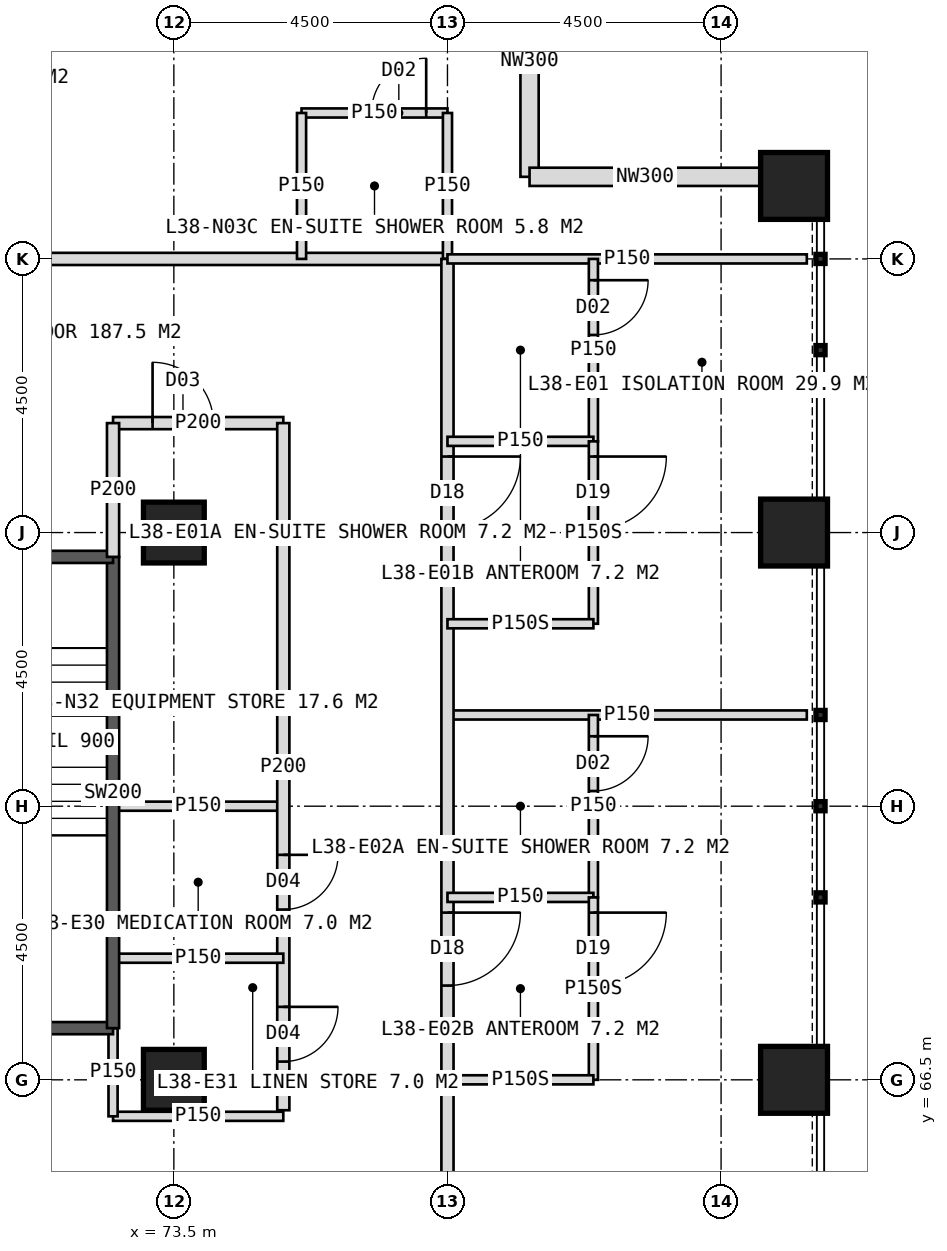
"""IFC4 building model, lengths in metres.
Left out: names, types, materials, properties, quantities, classifications, styles, units other than length and angle.
Written with IfcOpenShell. Run it as: python <this file> out.ifc"""

import sys

from ifc_helpers import new_model, si_unit, direction, frame, frame_2d, origin, origin_2d, place, context, subcontext, project, spatial, rectangle, hollow_rectangle, extrude, element, fill, save


model = new_model("IFC4")
c1 = context("Model", 3, precision=1e-05, world=origin(), true_north=direction((0.0, 1.0)))
c2 = subcontext(c1, "Body", "Model", "MODEL_VIEW")
j1 = project(units=[si_unit("LENGTHUNIT", "METRE"), si_unit("PLANEANGLEUNIT", "RADIAN")], contexts=[c1])
p1 = place(None, origin())
s1 = spatial("IfcSite", under=j1, at=p1, CompositionType="ELEMENT")
p2 = place(p1, origin())
s2 = spatial("IfcBuilding", under=s1, at=p2, CompositionType="ELEMENT")
p3 = place(p2, frame((0.0, 0.0, 160.0)))
s3 = spatial("IfcBuildingStorey", under=s2, at=p3, CompositionType="ELEMENT", Elevation=160.0)
for number, where, z_axis, x_axis in (
    (1, (73.5, 75.5, 0.0), (0.0, 0.0, 1.0), (1.0, 0.0, 0.0)),
    (2, (73.5, 66.5, 0.0), (0.0, 0.0, 1.0), (1.0, 0.0, 0.0)),
):
    element("IfcColumn", number, at=place(p3, frame(where, z_axis=z_axis, x_axis=x_axis)), inside=s3, PredefinedType="COLUMN", context=c2, shape_type="SweptSolid", body=[
        extrude(hollow_rectangle(XDim=1.0, YDim=1.0, WallThickness=0.1, at=origin_2d()), origin(), (0.0, 0.0, 1.0), 4.0),
    ])
for number, where, z_axis, x_axis in (
    (3, (83.7, 66.5, 0.0), (0.0, 0.0, 1.0), (1.0, 0.0, 0.0)),
    (4, (83.7, 75.5, 0.0), (0.0, 0.0, 1.0), (1.0, 0.0, 0.0)),
    (5, (83.7, 81.2, 0.0), (0.0, 0.0, 1.0), (1.0, 0.0, 0.0)),
):
    element("IfcColumn", number, at=place(p3, frame(where, z_axis=z_axis, x_axis=x_axis)), inside=s3, PredefinedType="COLUMN", context=c2, shape_type="SweptSolid", body=[
        extrude(hollow_rectangle(XDim=1.1, YDim=1.1, WallThickness=0.1, at=origin_2d()), origin(), (0.0, 0.0, 1.0), 4.0),
    ])
for number, where, z_axis, x_axis in (
    (6, (79.35, 85.15, 0.0), (0.0, 0.0, 1.0), (0.0, -1.0, 0.0)),
    (7, (79.35, 81.35, 0.0), (0.0, 0.0, 1.0), (1.0, 0.0, 0.0)),
):
    element("IfcWall", number, at=place(p3, frame(where, z_axis=z_axis, x_axis=x_axis)), inside=s3, PredefinedType="ELEMENTEDWALL", context=c2, shape_type="SweptSolid", body=[
        extrude(rectangle(XDim=3.8, YDim=0.3, at=frame_2d((1.9, 0.0))), origin(), (0.0, 0.0, 1.0), 4.0),
    ])
p4 = place(p3, frame((42.0, 80.0, 0.0), z_axis=(0.0, 0.0, 1.0), x_axis=(1.0, 0.0, 0.0)))
e8 = element("IfcWall", 8, at=p4, inside=s3, PredefinedType="PARTITIONING", context=c2, shape_type="SweptSolid", body=[
    extrude(rectangle(XDim=36.0, YDim=0.2, at=frame_2d((18.0, 0.0))), origin(), (0.0, 0.0, 1.0), 3.75),
])
p5 = place(p4, frame((3.25, 0.0, 0.0)))
e9 = element("IfcOpeningElement", 9, at=p5, cuts=e8, PredefinedType="OPENING", context=c2, shape_type="SweptSolid", body=[
    extrude(rectangle(XDim=1.2, YDim=2.2, at=frame_2d((0.6, 1.1))), frame((0.0, 0.11, 0.0), z_axis=(0.0, -1.0, 0.0), x_axis=(1.0, 0.0, 0.0)), (0.0, 0.0, 1.0), 0.22),
])
p6 = place(p4, frame((13.75, 0.0, 0.0)))
e10 = element("IfcOpeningElement", 10, at=p6, cuts=e8, PredefinedType="OPENING", context=c2, shape_type="SweptSolid", body=[
    extrude(rectangle(XDim=1.0, YDim=2.1, at=frame_2d((0.5, 1.05))), frame((0.0, 0.11, 0.0), z_axis=(0.0, -1.0, 0.0), x_axis=(1.0, 0.0, 0.0)), (0.0, 0.0, 1.0), 0.22),
])
p7 = place(p4, frame((22.15, 0.0, 0.0)))
e11 = element("IfcOpeningElement", 11, at=p7, cuts=e8, PredefinedType="OPENING", context=c2, shape_type="SweptSolid", body=[
    extrude(rectangle(XDim=1.2, YDim=2.2, at=frame_2d((0.6, 1.1))), frame((0.0, 0.11, 0.0), z_axis=(0.0, -1.0, 0.0), x_axis=(1.0, 0.0, 0.0)), (0.0, 0.0, 1.0), 0.22),
])
p8 = place(p3, frame((75.6, 82.4, 0.0), z_axis=(0.0, 0.0, 1.0), x_axis=(1.0, 0.0, 0.0)))
e12 = element("IfcWall", 12, at=p8, inside=s3, PredefinedType="PARTITIONING", context=c2, shape_type="SweptSolid", body=[
    extrude(rectangle(XDim=2.4, YDim=0.15, at=frame_2d((1.2, 0.0))), origin(), (0.0, 0.0, 1.0), 3.75),
])
p9 = place(p8, frame((1.15, 0.0, 0.0)))
e13 = element("IfcOpeningElement", 13, at=p9, cuts=e12, PredefinedType="OPENING", context=c2, shape_type="SweptSolid", body=[
    extrude(rectangle(XDim=0.9, YDim=2.1, at=frame_2d((0.45, 1.05))), frame((0.0, 0.085, 0.0), z_axis=(0.0, -1.0, 0.0), x_axis=(1.0, 0.0, 0.0)), (0.0, 0.0, 1.0), 0.17),
])
for number, where, z_axis, x_axis in (
    (14, (75.6, 80.0, 0.0), (0.0, 0.0, 1.0), (0.0, 1.0, 0.0)),
    (15, (78.0, 80.0, 0.0), (0.0, 0.0, 1.0), (0.0, 1.0, 0.0)),
):
    element("IfcWall", number, at=place(p3, frame(where, z_axis=z_axis, x_axis=x_axis)), inside=s3, PredefinedType="PARTITIONING", context=c2, shape_type="SweptSolid", body=[
        extrude(rectangle(XDim=2.4, YDim=0.15, at=frame_2d((1.2, 0.0))), origin(), (0.0, 0.0, 1.0), 3.75),
    ])
p10 = place(p3, frame((72.5, 77.3, 0.0), z_axis=(0.0, 0.0, 1.0), x_axis=(1.0, 0.0, 0.0)))
e16 = element("IfcWall", 16, at=p10, inside=s3, PredefinedType="PARTITIONING", context=c2, shape_type="SweptSolid", body=[
    extrude(rectangle(XDim=2.8, YDim=0.2, at=frame_2d((1.4, 0.0))), origin(), (0.0, 0.0, 1.0), 3.75),
])
p11 = place(p10, frame((0.65, 0.0, 0.0)))
e17 = element("IfcOpeningElement", 17, at=p11, cuts=e16, PredefinedType="OPENING", context=c2, shape_type="SweptSolid", body=[
    extrude(rectangle(XDim=1.0, YDim=2.1, at=frame_2d((0.5, 1.05))), frame((0.0, 0.11, 0.0), z_axis=(0.0, -1.0, 0.0), x_axis=(1.0, 0.0, 0.0)), (0.0, 0.0, 1.0), 0.22),
])
p12 = place(p3, frame((78.0, 72.5, 0.0), z_axis=(0.0, 0.0, 1.0), x_axis=(1.0, 0.0, 0.0)))
e18 = element("IfcWall", 18, at=p12, inside=s3, PredefinedType="PARTITIONING", context=c2, shape_type="SweptSolid", body=[
    extrude(rectangle(XDim=5.91, YDim=0.15, at=frame_2d((2.955, 0.0))), origin(), (0.0, 0.0, 1.0), 3.75),
])
p13 = place(p3, frame((78.0, 80.0, 0.0), z_axis=(0.0, 0.0, 1.0), x_axis=(0.0, -1.0, 0.0)))
e19 = element("IfcWall", 19, at=p13, inside=s3, PredefinedType="PARTITIONING", context=c2, shape_type="SweptSolid", body=[
    extrude(rectangle(XDim=36.0, YDim=0.2, at=frame_2d((18.0, 0.0))), origin(), (0.0, 0.0, 1.0), 3.75),
])
p14 = place(p13, frame((3.25, 0.0, 0.0)))
e20 = element("IfcOpeningElement", 20, at=p14, cuts=e19, PredefinedType="OPENING", context=c2, shape_type="SweptSolid", body=[
    extrude(rectangle(XDim=1.2, YDim=2.2, at=frame_2d((0.6, 1.1))), frame((0.0, 0.11, 0.0), z_axis=(0.0, -1.0, 0.0), x_axis=(1.0, 0.0, 0.0)), (0.0, 0.0, 1.0), 0.22),
])
p15 = place(p13, frame((10.75, 0.0, 0.0)))
e21 = element("IfcOpeningElement", 21, at=p15, cuts=e19, PredefinedType="OPENING", context=c2, shape_type="SweptSolid", body=[
    extrude(rectangle(XDim=1.2, YDim=2.2, at=frame_2d((0.6, 1.1))), frame((0.0, 0.11, 0.0), z_axis=(0.0, -1.0, 0.0), x_axis=(1.0, 0.0, 0.0)), (0.0, 0.0, 1.0), 0.22),
])
p16 = place(p13, frame((21.25, 0.0, 0.0)))
e22 = element("IfcOpeningElement", 22, at=p16, cuts=e19, PredefinedType="OPENING", context=c2, shape_type="SweptSolid", body=[
    extrude(rectangle(XDim=1.2, YDim=2.2, at=frame_2d((0.6, 1.1))), frame((0.0, 0.11, 0.0), z_axis=(0.0, -1.0, 0.0), x_axis=(1.0, 0.0, 0.0)), (0.0, 0.0, 1.0), 0.22),
])
p17 = place(p13, frame((31.75, 0.0, 0.0)))
e23 = element("IfcOpeningElement", 23, at=p17, cuts=e19, PredefinedType="OPENING", context=c2, shape_type="SweptSolid", body=[
    extrude(rectangle(XDim=1.2, YDim=2.2, at=frame_2d((0.6, 1.1))), frame((0.0, 0.11, 0.0), z_axis=(0.0, -1.0, 0.0), x_axis=(1.0, 0.0, 0.0)), (0.0, 0.0, 1.0), 0.22),
])
p18 = place(p3, frame((78.0, 80.0, 0.0), z_axis=(0.0, 0.0, 1.0), x_axis=(1.0, 0.0, 0.0)))
e24 = element("IfcWall", 24, at=p18, inside=s3, PredefinedType="PARTITIONING", context=c2, shape_type="SweptSolid", body=[
    extrude(rectangle(XDim=5.91, YDim=0.15, at=frame_2d((2.955, 0.0))), origin(), (0.0, 0.0, 1.0), 3.75),
])
p19 = place(p3, frame((80.4, 80.0, 0.0), z_axis=(0.0, 0.0, 1.0), x_axis=(0.0, -1.0, 0.0)))
e25 = element("IfcWall", 25, at=p19, inside=s3, PredefinedType="PARTITIONING", context=c2, shape_type="SweptSolid", body=[
    extrude(rectangle(XDim=3.0, YDim=0.15, at=frame_2d((1.5, 0.0))), origin(), (0.0, 0.0, 1.0), 3.75),
])
p20 = place(p19, frame((0.35, 0.0, 0.0)))
e26 = element("IfcOpeningElement", 26, at=p20, cuts=e25, PredefinedType="OPENING", context=c2, shape_type="SweptSolid", body=[
    extrude(rectangle(XDim=0.9, YDim=2.1, at=frame_2d((0.45, 1.05))), frame((0.0, 0.085, 0.0), z_axis=(0.0, -1.0, 0.0), x_axis=(1.0, 0.0, 0.0)), (0.0, 0.0, 1.0), 0.17),
])
p21 = place(p3, frame((78.0, 77.0, 0.0), z_axis=(0.0, 0.0, 1.0), x_axis=(1.0, 0.0, 0.0)))
e27 = element("IfcWall", 27, at=p21, inside=s3, PredefinedType="PARTITIONING", context=c2, shape_type="SweptSolid", body=[
    extrude(rectangle(XDim=2.4, YDim=0.15, at=frame_2d((1.2, 0.0))), origin(), (0.0, 0.0, 1.0), 3.75),
])
p22 = place(p3, frame((80.4, 77.0, 0.0), z_axis=(0.0, 0.0, 1.0), x_axis=(0.0, -1.0, 0.0)))
e28 = element("IfcWall", 28, at=p22, inside=s3, PredefinedType="PARTITIONING", context=c2, shape_type="SweptSolid", body=[
    extrude(rectangle(XDim=3.0, YDim=0.15, at=frame_2d((1.5, 0.0))), origin(), (0.0, 0.0, 1.0), 3.75),
])
p23 = place(p22, frame((0.25, 0.0, 0.0)))
e29 = element("IfcOpeningElement", 29, at=p23, cuts=e28, PredefinedType="OPENING", context=c2, shape_type="SweptSolid", body=[
    extrude(rectangle(XDim=1.2, YDim=2.2, at=frame_2d((0.6, 1.1))), frame((0.0, 0.085, 0.0), z_axis=(0.0, -1.0, 0.0), x_axis=(1.0, 0.0, 0.0)), (0.0, 0.0, 1.0), 0.17),
])
p24 = place(p3, frame((78.0, 74.0, 0.0), z_axis=(0.0, 0.0, 1.0), x_axis=(1.0, 0.0, 0.0)))
e30 = element("IfcWall", 30, at=p24, inside=s3, PredefinedType="PARTITIONING", context=c2, shape_type="SweptSolid", body=[
    extrude(rectangle(XDim=2.4, YDim=0.15, at=frame_2d((1.2, 0.0))), origin(), (0.0, 0.0, 1.0), 3.75),
])
p25 = place(p3, frame((80.4, 72.5, 0.0), z_axis=(0.0, 0.0, 1.0), x_axis=(0.0, -1.0, 0.0)))
e31 = element("IfcWall", 31, at=p25, inside=s3, PredefinedType="PARTITIONING", context=c2, shape_type="SweptSolid", body=[
    extrude(rectangle(XDim=3.0, YDim=0.15, at=frame_2d((1.5, 0.0))), origin(), (0.0, 0.0, 1.0), 3.75),
])
p26 = place(p25, frame((0.35, 0.0, 0.0)))
e32 = element("IfcOpeningElement", 32, at=p26, cuts=e31, PredefinedType="OPENING", context=c2, shape_type="SweptSolid", body=[
    extrude(rectangle(XDim=0.9, YDim=2.1, at=frame_2d((0.45, 1.05))), frame((0.0, 0.085, 0.0), z_axis=(0.0, -1.0, 0.0), x_axis=(1.0, 0.0, 0.0)), (0.0, 0.0, 1.0), 0.17),
])
p27 = place(p3, frame((78.0, 69.5, 0.0), z_axis=(0.0, 0.0, 1.0), x_axis=(1.0, 0.0, 0.0)))
e33 = element("IfcWall", 33, at=p27, inside=s3, PredefinedType="PARTITIONING", context=c2, shape_type="SweptSolid", body=[
    extrude(rectangle(XDim=2.4, YDim=0.15, at=frame_2d((1.2, 0.0))), origin(), (0.0, 0.0, 1.0), 3.75),
])
p28 = place(p3, frame((80.4, 69.5, 0.0), z_axis=(0.0, 0.0, 1.0), x_axis=(0.0, -1.0, 0.0)))
e34 = element("IfcWall", 34, at=p28, inside=s3, PredefinedType="PARTITIONING", context=c2, shape_type="SweptSolid", body=[
    extrude(rectangle(XDim=3.0, YDim=0.15, at=frame_2d((1.5, 0.0))), origin(), (0.0, 0.0, 1.0), 3.75),
])
p29 = place(p28, frame((0.25, 0.0, 0.0)))
e35 = element("IfcOpeningElement", 35, at=p29, cuts=e34, PredefinedType="OPENING", context=c2, shape_type="SweptSolid", body=[
    extrude(rectangle(XDim=1.2, YDim=2.2, at=frame_2d((0.6, 1.1))), frame((0.0, 0.085, 0.0), z_axis=(0.0, -1.0, 0.0), x_axis=(1.0, 0.0, 0.0)), (0.0, 0.0, 1.0), 0.17),
])
p30 = place(p3, frame((78.0, 66.5, 0.0), z_axis=(0.0, 0.0, 1.0), x_axis=(1.0, 0.0, 0.0)))
e36 = element("IfcWall", 36, at=p30, inside=s3, PredefinedType="PARTITIONING", context=c2, shape_type="SweptSolid", body=[
    extrude(rectangle(XDim=2.4, YDim=0.15, at=frame_2d((1.2, 0.0))), origin(), (0.0, 0.0, 1.0), 2.95),
])
p31 = place(p3, frame((72.5, 71.0, 0.0), z_axis=(0.0, 0.0, 1.0), x_axis=(1.0, 0.0, 0.0)))
e37 = element("IfcWall", 37, at=p31, inside=s3, PredefinedType="PARTITIONING", context=c2, shape_type="SweptSolid", body=[
    extrude(rectangle(XDim=2.8, YDim=0.15, at=frame_2d((1.4, 0.0))), origin(), (0.0, 0.0, 1.0), 3.75),
])
p32 = place(p3, frame((75.3, 77.3, 0.0), z_axis=(0.0, 0.0, 1.0), x_axis=(0.0, -1.0, 0.0)))
e38 = element("IfcWall", 38, at=p32, inside=s3, PredefinedType="PARTITIONING", context=c2, shape_type="SweptSolid", body=[
    extrude(rectangle(XDim=11.3, YDim=0.2, at=frame_2d((5.65, 0.0))), origin(), (0.0, 0.0, 1.0), 3.75),
])
p33 = place(p32, frame((7.1, 0.0, 0.0)))
e39 = element("IfcOpeningElement", 39, at=p33, cuts=e38, PredefinedType="OPENING", context=c2, shape_type="SweptSolid", body=[
    extrude(rectangle(XDim=0.9, YDim=2.1, at=frame_2d((0.45, 1.05))), frame((0.0, 0.11, 0.0), z_axis=(0.0, -1.0, 0.0), x_axis=(1.0, 0.0, 0.0)), (0.0, 0.0, 1.0), 0.22),
])
p34 = place(p32, frame((9.6, 0.0, 0.0)))
e40 = element("IfcOpeningElement", 40, at=p34, cuts=e38, PredefinedType="OPENING", context=c2, shape_type="SweptSolid", body=[
    extrude(rectangle(XDim=0.9, YDim=2.1, at=frame_2d((0.45, 1.05))), frame((0.0, 0.11, 0.0), z_axis=(0.0, -1.0, 0.0), x_axis=(1.0, 0.0, 0.0)), (0.0, 0.0, 1.0), 0.22),
])
for number, where, z_axis, x_axis in (
    (41, (72.5, 65.9, 0.0), (0.0, 0.0, 1.0), (1.0, 0.0, 0.0)),
    (42, (72.5, 68.5, 0.0), (0.0, 0.0, 1.0), (1.0, 0.0, 0.0)),
):
    element("IfcWall", number, at=place(p3, frame(where, z_axis=z_axis, x_axis=x_axis)), inside=s3, PredefinedType="PARTITIONING", context=c2, shape_type="SweptSolid", body=[
        extrude(rectangle(XDim=2.8, YDim=0.15, at=frame_2d((1.4, 0.0))), origin(), (0.0, 0.0, 1.0), 3.75),
    ])
p35 = place(p3, frame((72.5, 65.9, 0.0), z_axis=(0.0, 0.0, 1.0), x_axis=(0.0, 1.0, 0.0)))
e43 = element("IfcWall", 43, at=p35, inside=s3, PredefinedType="PARTITIONING", context=c2, shape_type="SweptSolid", body=[
    extrude(rectangle(XDim=1.45, YDim=0.15, at=frame_2d((0.725, 0.0))), origin(), (0.0, 0.0, 1.0), 3.75),
])
p36 = place(p3, frame((69.0, 67.35, 0.0), z_axis=(0.0, 0.0, 1.0), x_axis=(1.0, 0.0, 0.0)))
e44 = element("IfcWall", 44, at=p36, inside=s3, PredefinedType="SOLIDWALL", context=c2, shape_type="SweptSolid", body=[
    extrude(rectangle(XDim=3.5, YDim=0.2, at=frame_2d((1.75, 0.0))), origin(), (0.0, 0.0, 1.0), 3.75),
])
p37 = place(p3, frame((72.5, 67.35, 0.0), z_axis=(0.0, 0.0, 1.0), x_axis=(0.0, 1.0, 0.0)))
e45 = element("IfcWall", 45, at=p37, inside=s3, PredefinedType="SOLIDWALL", context=c2, shape_type="SweptSolid", body=[
    extrude(rectangle(XDim=7.75, YDim=0.2, at=frame_2d((3.875, 0.0))), origin(), (0.0, 0.0, 1.0), 3.75),
])
p38 = place(p3, frame((69.0, 75.1, 0.0), z_axis=(0.0, 0.0, 1.0), x_axis=(1.0, 0.0, 0.0)))
e46 = element("IfcWall", 46, at=p38, inside=s3, PredefinedType="SOLIDWALL", context=c2, shape_type="SweptSolid", body=[
    extrude(rectangle(XDim=3.5, YDim=0.2, at=frame_2d((1.75, 0.0))), origin(), (0.0, 0.0, 1.0), 3.75),
])
p39 = place(p38, frame((1.15, 0.0, 0.0)))
e47 = element("IfcOpeningElement", 47, at=p39, cuts=e46, PredefinedType="OPENING", context=c2, shape_type="SweptSolid", body=[
    extrude(rectangle(XDim=1.2, YDim=2.1, at=frame_2d((0.6, 1.05))), frame((0.0, 0.11, 0.0), z_axis=(0.0, -1.0, 0.0), x_axis=(1.0, 0.0, 0.0)), (0.0, 0.0, 1.0), 0.22),
])
p40 = place(p3, frame((72.5, 75.1, 0.0), z_axis=(0.0, 0.0, 1.0), x_axis=(0.0, 1.0, 0.0)))
e48 = element("IfcWall", 48, at=p40, inside=s3, PredefinedType="PARTITIONING", context=c2, shape_type="SweptSolid", body=[
    extrude(rectangle(XDim=2.2, YDim=0.2, at=frame_2d((1.1, 0.0))), origin(), (0.0, 0.0, 1.0), 3.75),
])
p41 = place(p9, origin())
e49 = element("IfcDoor", 49, at=p41, inside=s3, OperationType="SINGLE_SWING_RIGHT", PredefinedType="DOOR", context=c2, shape_type="SweptSolid", body=[
    extrude(rectangle(XDim=0.9, YDim=2.1, at=frame_2d((0.45, 1.05))), frame((0.0, 0.025, 0.0), z_axis=(0.0, -1.0, 0.0), x_axis=(1.0, 0.0, 0.0)), (0.0, 0.0, 1.0), 0.05),
])
fill(e13, e49)
p42 = place(p11, origin())
e50 = element("IfcDoor", 50, at=p42, inside=s3, OperationType="SINGLE_SWING_LEFT", PredefinedType="DOOR", context=c2, shape_type="SweptSolid", body=[
    extrude(rectangle(XDim=1.0, YDim=2.1, at=frame_2d((0.5, 1.05))), frame((0.0, 0.025, 0.0), z_axis=(0.0, -1.0, 0.0), x_axis=(1.0, 0.0, 0.0)), (0.0, 0.0, 1.0), 0.05),
])
fill(e17, e50)
p43 = place(p23, origin())
e51 = element("IfcDoor", 51, at=p43, inside=s3, OperationType="SINGLE_SWING_LEFT", PredefinedType="DOOR", context=c2, shape_type="SweptSolid", body=[
    extrude(rectangle(XDim=1.2, YDim=2.2, at=frame_2d((0.6, 1.1))), frame((0.0, 0.025, 0.0), z_axis=(0.0, -1.0, 0.0), x_axis=(1.0, 0.0, 0.0)), (0.0, 0.0, 1.0), 0.05),
])
fill(e29, e51)
p44 = place(p14, origin())
e52 = element("IfcDoor", 52, at=p44, inside=s3, OperationType="SINGLE_SWING_LEFT", PredefinedType="DOOR", context=c2, shape_type="SweptSolid", body=[
    extrude(rectangle(XDim=1.2, YDim=2.2, at=frame_2d((0.6, 1.1))), frame((0.0, 0.025, 0.0), z_axis=(0.0, -1.0, 0.0), x_axis=(1.0, 0.0, 0.0)), (0.0, 0.0, 1.0), 0.05),
])
fill(e20, e52)
p45 = place(p20, origin())
e53 = element("IfcDoor", 53, at=p45, inside=s3, OperationType="SINGLE_SWING_LEFT", PredefinedType="DOOR", context=c2, shape_type="SweptSolid", body=[
    extrude(rectangle(XDim=0.9, YDim=2.1, at=frame_2d((0.45, 1.05))), frame((0.0, 0.025, 0.0), z_axis=(0.0, -1.0, 0.0), x_axis=(1.0, 0.0, 0.0)), (0.0, 0.0, 1.0), 0.05),
])
fill(e26, e53)
p46 = place(p29, origin())
e54 = element("IfcDoor", 54, at=p46, inside=s3, OperationType="SINGLE_SWING_LEFT", PredefinedType="DOOR", context=c2, shape_type="SweptSolid", body=[
    extrude(rectangle(XDim=1.2, YDim=2.2, at=frame_2d((0.6, 1.1))), frame((0.0, 0.025, 0.0), z_axis=(0.0, -1.0, 0.0), x_axis=(1.0, 0.0, 0.0)), (0.0, 0.0, 1.0), 0.05),
])
fill(e35, e54)
p47 = place(p15, origin())
e55 = element("IfcDoor", 55, at=p47, inside=s3, OperationType="SINGLE_SWING_LEFT", PredefinedType="DOOR", context=c2, shape_type="SweptSolid", body=[
    extrude(rectangle(XDim=1.2, YDim=2.2, at=frame_2d((0.6, 1.1))), frame((0.0, 0.025, 0.0), z_axis=(0.0, -1.0, 0.0), x_axis=(1.0, 0.0, 0.0)), (0.0, 0.0, 1.0), 0.05),
])
fill(e21, e55)
p48 = place(p26, origin())
e56 = element("IfcDoor", 56, at=p48, inside=s3, OperationType="SINGLE_SWING_LEFT", PredefinedType="DOOR", context=c2, shape_type="SweptSolid", body=[
    extrude(rectangle(XDim=0.9, YDim=2.1, at=frame_2d((0.45, 1.05))), frame((0.0, 0.025, 0.0), z_axis=(0.0, -1.0, 0.0), x_axis=(1.0, 0.0, 0.0)), (0.0, 0.0, 1.0), 0.05),
])
fill(e32, e56)
p49 = place(p33, origin())
e57 = element("IfcDoor", 57, at=p49, inside=s3, OperationType="SINGLE_SWING_LEFT", PredefinedType="DOOR", context=c2, shape_type="SweptSolid", body=[
    extrude(rectangle(XDim=0.9, YDim=2.1, at=frame_2d((0.45, 1.05))), frame((0.0, 0.025, 0.0), z_axis=(0.0, -1.0, 0.0), x_axis=(1.0, 0.0, 0.0)), (0.0, 0.0, 1.0), 0.05),
])
fill(e39, e57)
p50 = place(p34, origin())
e58 = element("IfcDoor", 58, at=p50, inside=s3, OperationType="SINGLE_SWING_LEFT", PredefinedType="DOOR", context=c2, shape_type="SweptSolid", body=[
    extrude(rectangle(XDim=0.9, YDim=2.1, at=frame_2d((0.45, 1.05))), frame((0.0, 0.025, 0.0), z_axis=(0.0, -1.0, 0.0), x_axis=(1.0, 0.0, 0.0)), (0.0, 0.0, 1.0), 0.05),
])
fill(e40, e58)
save(model, sys.argv[1])
